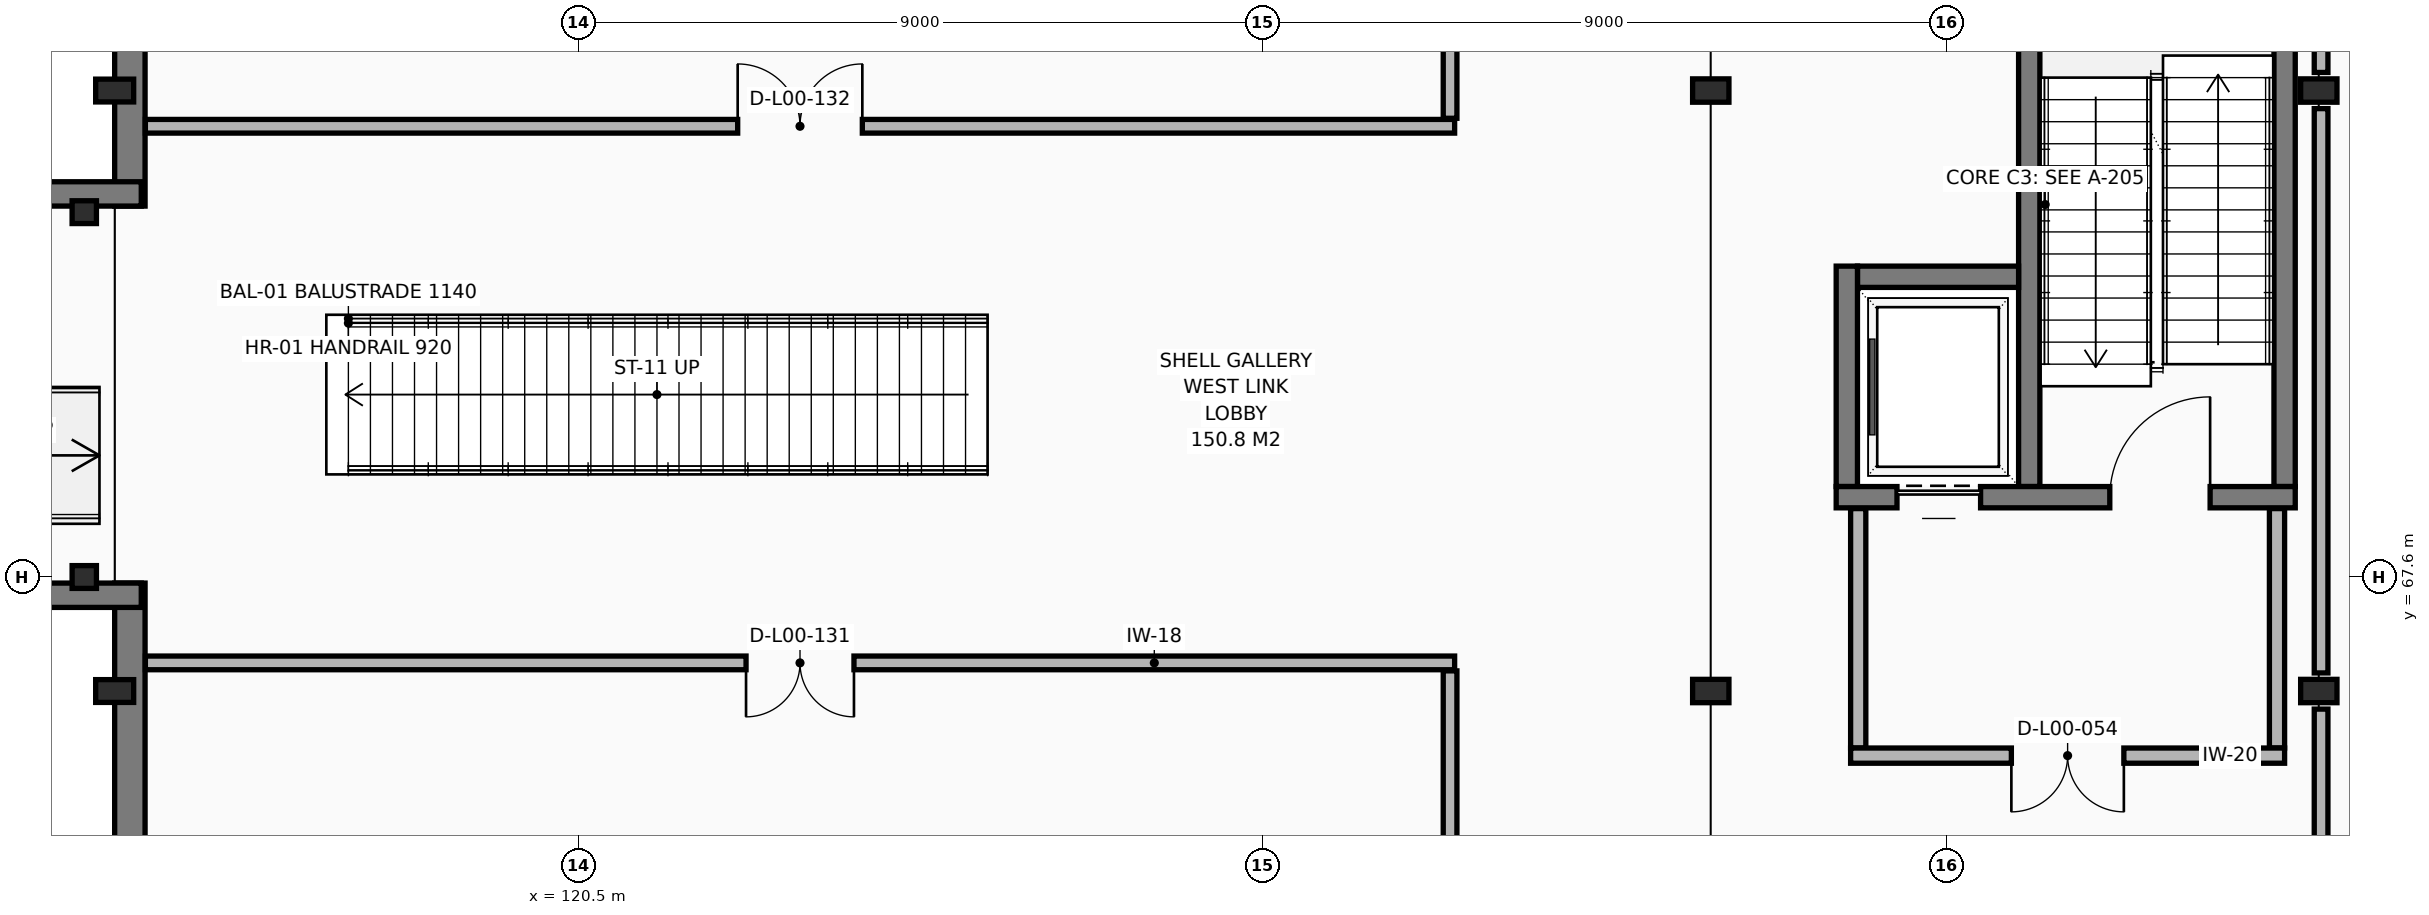
"""IFC4 building model, lengths in metres.
Left out: names, types, materials, properties, quantities, classifications, styles, units other than length and angle.
Written with IfcOpenShell. Run it as: python <this file> out.ifc"""

import sys

from ifc_helpers import new_model, si_unit, direction, frame, frame_2d, origin, origin_2d, place, context, subcontext, project, spatial, rectangle, i_section, extrude, element, fill, save


model = new_model("IFC4")
c1 = context("Model", 3, precision=1e-05, world=origin(), true_north=direction((0.0, 1.0)))
c2 = subcontext(c1, "Body", "Model", "MODEL_VIEW")
j1 = project(units=[si_unit("LENGTHUNIT", "METRE"), si_unit("PLANEANGLEUNIT", "RADIAN")], contexts=[c1])
p1 = place(None, origin())
s1 = spatial("IfcSite", under=j1, at=p1, CompositionType="ELEMENT")
p2 = place(p1, origin())
s2 = spatial("IfcBuilding", under=s1, at=p2, CompositionType="ELEMENT")
p3 = place(p2, origin())
s3 = spatial("IfcBuildingStorey", under=s2, at=p3, CompositionType="ELEMENT", Elevation=0.0)
for number, where, z_axis, x_axis in (
    (1, (114.4, 66.1, 0.0), (0.0, 0.0, 1.0), (1.0, 0.0, 0.0)),
    (2, (114.4, 74.0, 0.0), (0.0, 0.0, 1.0), (1.0, 0.0, 0.0)),
):
    element("IfcColumn", number, at=place(p3, frame(where, z_axis=z_axis, x_axis=x_axis)), inside=s3, PredefinedType="COLUMN", context=c2, shape_type="SweptSolid", body=[
        extrude(i_section(OverallWidth=0.3, OverallDepth=0.5, WebThickness=0.014, FlangeThickness=0.028, FilletRadius=0.027, at=origin_2d()), origin(), (0.0, 0.0, 1.0), 5.1),
    ])
for number, where, z_axis, x_axis in (
    (3, (135.4, 66.1, 0.0), (0.0, 0.0, 1.0), (1.0, 0.0, 0.0)),
    (4, (135.4, 74.0, 0.0), (0.0, 0.0, 1.0), (1.0, 0.0, 0.0)),
    (5, (143.4, 66.1, 0.0), (0.0, 0.0, 1.0), (1.0, 0.0, 0.0)),
    (6, (143.4, 74.0, 0.0), (0.0, 0.0, 1.0), (1.0, 0.0, 0.0)),
):
    element("IfcColumn", number, at=place(p3, frame(where, z_axis=z_axis, x_axis=x_axis)), inside=s3, PredefinedType="COLUMN", context=c2, shape_type="SweptSolid", body=[
        extrude(i_section(OverallWidth=0.307, OverallDepth=0.478, WebThickness=0.021, FlangeThickness=0.04, FilletRadius=0.027, at=origin_2d()), origin(), (0.0, 0.0, 1.0), 5.1),
    ])
for number, where, z_axis, x_axis in (
    (7, (114.0, 67.6, 0.0), (0.0, 0.0, 1.0), (1.0, 0.0, 0.0)),
    (8, (114.0, 72.4, 0.0), (0.0, 0.0, 1.0), (1.0, 0.0, 0.0)),
):
    element("IfcColumn", number, at=place(p3, frame(where, z_axis=z_axis, x_axis=x_axis)), inside=s3, PredefinedType="COLUMN", context=c2, shape_type="SweptSolid", body=[
        extrude(i_section(OverallWidth=0.3, OverallDepth=0.32, WebThickness=0.011, FlangeThickness=0.021, FilletRadius=0.027, at=origin_2d()), origin(), (0.0, 0.0, 1.0), 5.1),
    ])
p4 = place(p3, frame((114.6, 58.2, 0.0), z_axis=(0.0, 0.0, 1.0), x_axis=(0.0, 1.0, 0.0)))
e9 = element("IfcWall", 9, at=p4, inside=s3, PredefinedType="SOLIDWALL", context=c2, shape_type="SweptSolid", body=[
    extrude(rectangle(XDim=9.32, YDim=0.4, at=frame_2d((4.66, 0.0))), origin(), (0.0, 0.0, 1.0), 4.88),
])
p5 = place(p3, frame((114.6, 72.48, 0.0), z_axis=(0.0, 0.0, 1.0), x_axis=(0.0, 1.0, 0.0)))
e10 = element("IfcWall", 10, at=p5, inside=s3, PredefinedType="SOLIDWALL", context=c2, shape_type="SweptSolid", body=[
    extrude(rectangle(XDim=40.82, YDim=0.4, at=frame_2d((20.41, 0.0))), origin(), (0.0, 0.0, 1.0), 4.88),
])
p6 = place(p5, frame((5.803, 0.0, 0.85)))
e11 = element("IfcOpeningElement", 11, at=p6, cuts=e10, PredefinedType="OPENING", context=c2, shape_type="SweptSolid", body=[
    extrude(rectangle(XDim=2.7, YDim=1.5, at=frame_2d((1.35, 0.75))), frame((0.0, 0.21, 0.0), z_axis=(0.0, -1.0, 0.0), x_axis=(1.0, 0.0, 0.0)), (0.0, 0.0, 1.0), 0.42),
])
p7 = place(p5, frame((12.607, 0.0, 0.85)))
e12 = element("IfcOpeningElement", 12, at=p7, cuts=e10, PredefinedType="OPENING", context=c2, shape_type="SweptSolid", body=[
    extrude(rectangle(XDim=2.1, YDim=1.7, at=frame_2d((1.05, 0.85))), frame((0.0, 0.21, 0.0), z_axis=(0.0, -1.0, 0.0), x_axis=(1.0, 0.0, 0.0)), (0.0, 0.0, 1.0), 0.42),
])
p8 = place(p5, frame((19.41, 0.0, 0.85)))
e13 = element("IfcOpeningElement", 13, at=p8, cuts=e10, PredefinedType="OPENING", context=c2, shape_type="SweptSolid", body=[
    extrude(rectangle(XDim=2.5, YDim=1.7, at=frame_2d((1.25, 0.85))), frame((0.0, 0.21, 0.0), z_axis=(0.0, -1.0, 0.0), x_axis=(1.0, 0.0, 0.0)), (0.0, 0.0, 1.0), 0.42),
])
p9 = place(p5, frame((26.213, 0.0, 0.85)))
e14 = element("IfcOpeningElement", 14, at=p9, cuts=e10, PredefinedType="OPENING", context=c2, shape_type="SweptSolid", body=[
    extrude(rectangle(XDim=2.9, YDim=1.7, at=frame_2d((1.45, 0.85))), frame((0.0, 0.21, 0.0), z_axis=(0.0, -1.0, 0.0), x_axis=(1.0, 0.0, 0.0)), (0.0, 0.0, 1.0), 0.42),
])
p10 = place(p3, frame((114.75, 67.36, 0.0), z_axis=(0.0, 0.0, 1.0), x_axis=(-1.0, 0.0, 0.0)))
e15 = element("IfcWall", 15, at=p10, inside=s3, PredefinedType="SOLIDWALL", context=c2, shape_type="SweptSolid", body=[
    extrude(rectangle(XDim=6.466, YDim=0.32, at=frame_2d((3.233, 0.0))), origin(), (0.0, 0.0, 1.0), 4.82),
])
p11 = place(p3, frame((108.284, 72.64, 0.0), z_axis=(0.0, 0.0, 1.0), x_axis=(1.0, 0.0, 0.0)))
e16 = element("IfcWall", 16, at=p11, inside=s3, PredefinedType="SOLIDWALL", context=c2, shape_type="SweptSolid", body=[
    extrude(rectangle(XDim=6.466, YDim=0.32, at=frame_2d((3.233, 0.0))), origin(), (0.0, 0.0, 1.0), 4.82),
])
p12 = place(p11, frame((2.258, 0.0, 1.12)))
e17 = element("IfcOpeningElement", 17, at=p12, cuts=e16, PredefinedType="OPENING", context=c2, shape_type="SweptSolid", body=[
    extrude(rectangle(XDim=1.95, YDim=1.5, at=frame_2d((0.975, 0.75))), frame((0.0, 0.17, 0.0), z_axis=(0.0, -1.0, 0.0), x_axis=(1.0, 0.0, 0.0)), (0.0, 0.0, 1.0), 0.34),
])
for number, where, z_axis, x_axis in (
    (18, (142.95, 68.79, 0.0), (0.0, 0.0, 1.0), (0.0, 1.0, 0.0)),
    (19, (139.59, 76.49, 0.0), (0.0, 0.0, 1.0), (0.0, -1.0, 0.0)),
):
    element("IfcWall", number, at=place(p3, frame(where, z_axis=z_axis, x_axis=x_axis)), inside=s3, PredefinedType="SHEAR", context=c2, shape_type="SweptSolid", body=[
        extrude(rectangle(XDim=7.7, YDim=0.28, at=frame_2d((3.85, 0.0))), origin(), (0.0, 0.0, 1.0), 4.88),
    ])
p13 = place(p3, frame((139.45, 71.55, 0.0), z_axis=(0.0, 0.0, 1.0), x_axis=(-1.0, 0.0, 0.0)))
e20 = element("IfcWall", 20, at=p13, inside=s3, PredefinedType="SHEAR", context=c2, shape_type="SweptSolid", body=[
    extrude(rectangle(XDim=2.12, YDim=0.28, at=frame_2d((1.06, 0.0))), origin(), (0.0, 0.0, 1.0), 4.88),
])
p14 = place(p3, frame((137.19, 71.69, 0.0), z_axis=(0.0, 0.0, 1.0), x_axis=(0.0, -1.0, 0.0)))
e21 = element("IfcWall", 21, at=p14, inside=s3, PredefinedType="SHEAR", context=c2, shape_type="SweptSolid", body=[
    extrude(rectangle(XDim=2.9, YDim=0.28, at=frame_2d((1.45, 0.0))), origin(), (0.0, 0.0, 1.0), 4.88),
])
p15 = place(p3, frame((137.05, 68.65, 0.0), z_axis=(0.0, 0.0, 1.0), x_axis=(1.0, 0.0, 0.0)))
e22 = element("IfcWall", 22, at=p15, inside=s3, PredefinedType="SHEAR", context=c2, shape_type="SweptSolid", body=[
    extrude(rectangle(XDim=6.04, YDim=0.28, at=frame_2d((3.02, 0.0))), origin(), (0.0, 0.0, 1.0), 4.88),
])
p16 = place(p15, frame((0.8, 0.0, 0.0)))
e23 = element("IfcOpeningElement", 23, at=p16, cuts=e22, PredefinedType="OPENING", context=c2, shape_type="SweptSolid", body=[
    extrude(rectangle(XDim=1.1, YDim=2.12, at=frame_2d((0.55, 1.06))), frame((0.0, 0.15, 0.0), z_axis=(0.0, -1.0, 0.0), x_axis=(1.0, 0.0, 0.0)), (0.0, 0.0, 1.0), 0.3),
])
p17 = place(p15, frame((3.6, 0.0, 0.0)))
e24 = element("IfcOpeningElement", 24, at=p17, cuts=e22, PredefinedType="OPENING", context=c2, shape_type="SweptSolid", body=[
    extrude(rectangle(XDim=1.32, YDim=2.12, at=frame_2d((0.66, 1.06))), frame((0.0, 0.15, 0.0), z_axis=(0.0, -1.0, 0.0), x_axis=(1.0, 0.0, 0.0)), (0.0, 0.0, 1.0), 0.3),
])
for number, where, z_axis, x_axis in (
    (25, (142.85, 65.35, 0.0), (0.0, 0.0, 1.0), (0.0, 1.0, 0.0)),
    (26, (137.34, 68.5, 0.0), (0.0, 0.0, 1.0), (0.0, -1.0, 0.0)),
):
    element("IfcWall", number, at=place(p3, frame(where, z_axis=z_axis, x_axis=x_axis)), inside=s3, PredefinedType="PARTITIONING", context=c2, shape_type="SweptSolid", body=[
        extrude(rectangle(XDim=3.15, YDim=0.2, at=frame_2d((1.575, 0.0))), origin(), (0.0, 0.0, 1.0), 4.37),
    ])
p18 = place(p3, frame((142.95, 65.25, 0.0), z_axis=(0.0, 0.0, 1.0), x_axis=(-1.0, 0.0, 0.0)))
e27 = element("IfcWall", 27, at=p18, inside=s3, PredefinedType="PARTITIONING", context=c2, shape_type="SweptSolid", body=[
    extrude(rectangle(XDim=5.71, YDim=0.2, at=frame_2d((2.855, 0.0))), origin(), (0.0, 0.0, 1.0), 4.88),
])
p19 = place(p18, frame((2.115, 0.0, 0.0)))
e28 = element("IfcOpeningElement", 28, at=p19, cuts=e27, PredefinedType="OPENING", context=c2, shape_type="SweptSolid", body=[
    extrude(rectangle(XDim=1.48, YDim=2.15, at=frame_2d((0.74, 1.075))), frame((0.0, 0.11, 0.0), z_axis=(0.0, -1.0, 0.0), x_axis=(1.0, 0.0, 0.0)), (0.0, 0.0, 1.0), 0.22),
])
p20 = place(p3, frame((132.03, 66.47, 0.0), z_axis=(0.0, 0.0, 1.0), x_axis=(-1.0, 0.0, 0.0)))
e29 = element("IfcWall", 29, at=p20, inside=s3, PredefinedType="PARTITIONING", context=c2, shape_type="SweptSolid", body=[
    extrude(rectangle(XDim=17.226, YDim=0.18, at=frame_2d((8.613, 0.0))), origin(), (0.0, 0.0, 1.0), 4.87),
])
p21 = place(p20, frame((7.903, 0.0, 0.0)))
e30 = element("IfcOpeningElement", 30, at=p21, cuts=e29, PredefinedType="OPENING", context=c2, shape_type="SweptSolid", body=[
    extrude(rectangle(XDim=1.42, YDim=2.18, at=frame_2d((0.71, 1.09))), frame((0.0, 0.1, 0.0), z_axis=(0.0, -1.0, 0.0), x_axis=(1.0, 0.0, 0.0)), (0.0, 0.0, 1.0), 0.2),
])
p22 = place(p3, frame((114.804, 73.53, 0.0), z_axis=(0.0, 0.0, 1.0), x_axis=(1.0, 0.0, 0.0)))
e31 = element("IfcWall", 31, at=p22, inside=s3, PredefinedType="PARTITIONING", context=c2, shape_type="SweptSolid", body=[
    extrude(rectangle(XDim=17.226, YDim=0.18, at=frame_2d((8.613, 0.0))), origin(), (0.0, 0.0, 1.0), 4.87),
])
p23 = place(p22, frame((7.793, 0.0, 0.0)))
e32 = element("IfcOpeningElement", 32, at=p23, cuts=e31, PredefinedType="OPENING", context=c2, shape_type="SweptSolid", body=[
    extrude(rectangle(XDim=1.64, YDim=2.2, at=frame_2d((0.82, 1.1))), frame((0.0, 0.1, 0.0), z_axis=(0.0, -1.0, 0.0), x_axis=(1.0, 0.0, 0.0)), (0.0, 0.0, 1.0), 0.2),
])
p24 = place(p3, frame((131.97, 58.604, 0.0), z_axis=(0.0, 0.0, 1.0), x_axis=(0.0, 1.0, 0.0)))
e33 = element("IfcWall", 33, at=p24, inside=s3, PredefinedType="PARTITIONING", context=c2, shape_type="SweptSolid", body=[
    extrude(rectangle(XDim=7.761, YDim=0.18, at=frame_2d((3.88, 0.0))), origin(), (0.0, 0.0, 1.0), 3.96),
])
p25 = place(p3, frame((131.97, 73.635, 0.0), z_axis=(0.0, 0.0, 1.0), x_axis=(0.0, 1.0, 0.0)))
e34 = element("IfcWall", 34, at=p25, inside=s3, PredefinedType="PARTITIONING", context=c2, shape_type="SweptSolid", body=[
    extrude(rectangle(XDim=8.965, YDim=0.18, at=frame_2d((4.482, 0.0))), origin(), (0.0, 0.0, 1.0), 3.96),
])
p26 = place(p3, frame((143.43, 81.662, 0.0), z_axis=(0.0, 0.0, 1.0), x_axis=(0.0, -1.0, 0.0)))
e35 = element("IfcWall", 35, at=p26, inside=s3, PredefinedType="PARTITIONING", context=c2, shape_type="SweptSolid", body=[
    extrude(rectangle(XDim=7.424, YDim=0.18, at=frame_2d((3.712, 0.0))), origin(), (0.0, 0.0, 1.0), 3.96),
])
p27 = place(p26, frame((2.892, 0.0, 0.0)))
e36 = element("IfcOpeningElement", 36, at=p27, cuts=e35, PredefinedType="OPENING", context=c2, shape_type="SweptSolid", body=[
    extrude(rectangle(XDim=1.64, YDim=2.2, at=frame_2d((0.82, 1.1))), frame((0.0, 0.1, 0.0), z_axis=(0.0, -1.0, 0.0), x_axis=(1.0, 0.0, 0.0)), (0.0, 0.0, 1.0), 0.2),
])
p28 = place(p3, frame((143.43, 73.762, 0.0), z_axis=(0.0, 0.0, 1.0), x_axis=(0.0, -1.0, 0.0)))
e37 = element("IfcWall", 37, at=p28, inside=s3, PredefinedType="PARTITIONING", context=c2, shape_type="SweptSolid", body=[
    extrude(rectangle(XDim=7.424, YDim=0.18, at=frame_2d((3.712, 0.0))), origin(), (0.0, 0.0, 1.0), 3.96),
])
p29 = place(p3, frame((143.43, 65.862, 0.0), z_axis=(0.0, 0.0, 1.0), x_axis=(0.0, -1.0, 0.0)))
e38 = element("IfcWall", 38, at=p29, inside=s3, PredefinedType="PARTITIONING", context=c2, shape_type="SweptSolid", body=[
    extrude(rectangle(XDim=7.258, YDim=0.18, at=frame_2d((3.629, 0.0))), origin(), (0.0, 0.0, 1.0), 3.96),
])
p30 = place(p16, origin())
e39 = element("IfcDoor", 39, at=p30, inside=s3, OperationType="SLIDING_TO_LEFT", PredefinedType="DOOR", context=c2, shape_type="SweptSolid", body=[
    extrude(rectangle(XDim=1.1, YDim=2.12, at=frame_2d((0.55, 1.06))), frame((0.0, 0.025, 0.0), z_axis=(0.0, -1.0, 0.0), x_axis=(1.0, 0.0, 0.0)), (0.0, 0.0, 1.0), 0.05),
])
fill(e23, e39)
p31 = place(p17, origin())
e40 = element("IfcDoor", 40, at=p31, inside=s3, OperationType="SINGLE_SWING_RIGHT", PredefinedType="DOOR", context=c2, shape_type="SweptSolid", body=[
    extrude(rectangle(XDim=1.32, YDim=2.12, at=frame_2d((0.66, 1.06))), frame((0.0, 0.025, 0.0), z_axis=(0.0, -1.0, 0.0), x_axis=(1.0, 0.0, 0.0)), (0.0, 0.0, 1.0), 0.05),
])
fill(e24, e40)
p32 = place(p19, origin())
e41 = element("IfcDoor", 41, at=p32, inside=s3, OperationType="DOUBLE_DOOR_SINGLE_SWING", PredefinedType="DOOR", context=c2, shape_type="SweptSolid", body=[
    extrude(rectangle(XDim=1.48, YDim=2.15, at=frame_2d((0.74, 1.075))), frame((0.0, 0.025, 0.0), z_axis=(0.0, -1.0, 0.0), x_axis=(1.0, 0.0, 0.0)), (0.0, 0.0, 1.0), 0.05),
])
fill(e28, e41)
p33 = place(p21, origin())
e42 = element("IfcDoor", 42, at=p33, inside=s3, OperationType="DOUBLE_DOOR_SINGLE_SWING", PredefinedType="DOOR", context=c2, shape_type="SweptSolid", body=[
    extrude(rectangle(XDim=1.42, YDim=2.18, at=frame_2d((0.71, 1.09))), frame((0.0, 0.025, 0.0), z_axis=(0.0, -1.0, 0.0), x_axis=(1.0, 0.0, 0.0)), (0.0, 0.0, 1.0), 0.05),
])
fill(e30, e42)
p34 = place(p23, origin())
e43 = element("IfcDoor", 43, at=p34, inside=s3, OperationType="DOUBLE_DOOR_SINGLE_SWING", PredefinedType="DOOR", context=c2, shape_type="SweptSolid", body=[
    extrude(rectangle(XDim=1.64, YDim=2.2, at=frame_2d((0.82, 1.1))), frame((0.0, 0.025, 0.0), z_axis=(0.0, -1.0, 0.0), x_axis=(1.0, 0.0, 0.0)), (0.0, 0.0, 1.0), 0.05),
])
fill(e32, e43)
save(model, sys.argv[1])
